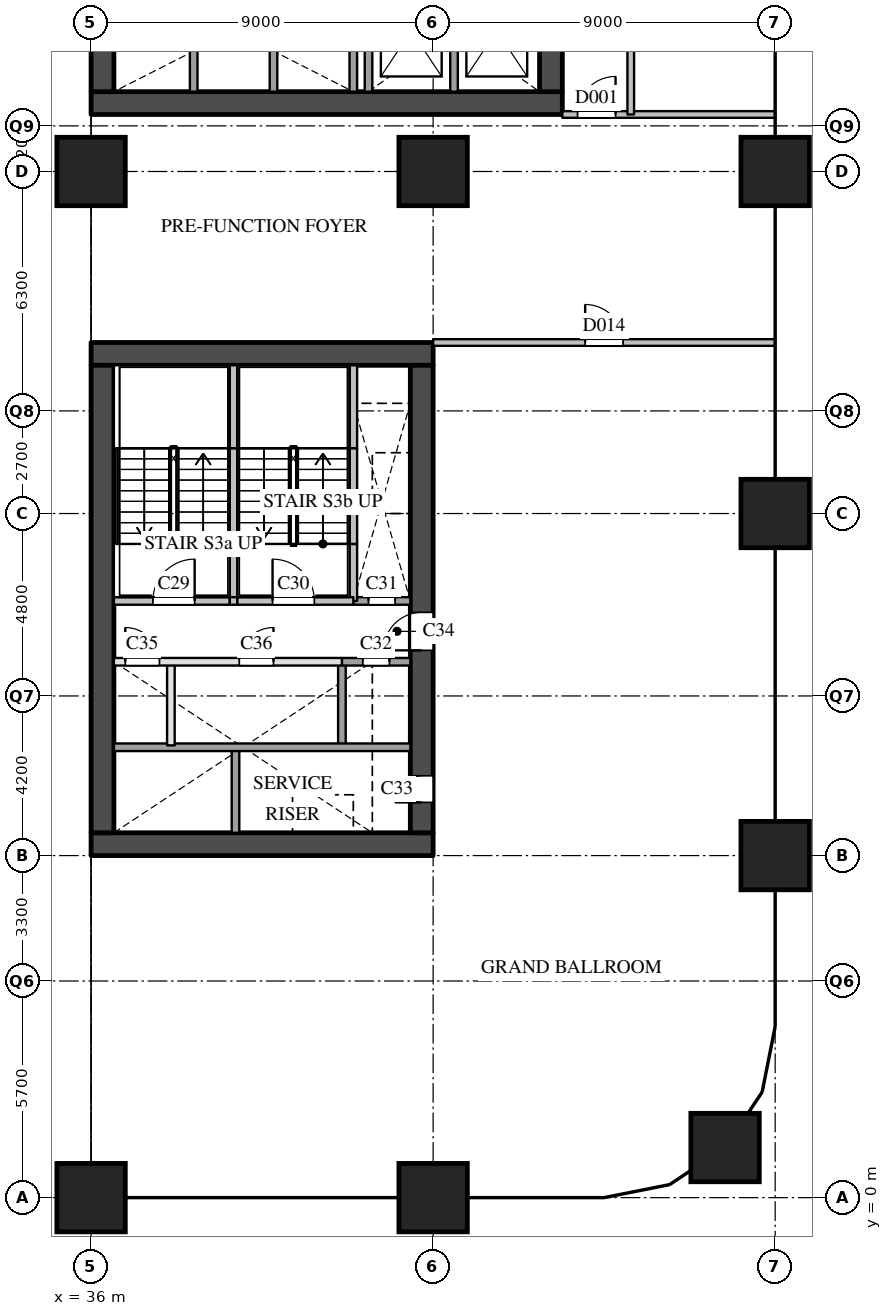
"""IFC4 building model, lengths in metres.
Left out: names, types, materials, properties, quantities, classifications, styles, units other than length and angle.
Written with IfcOpenShell. Run it as: python <this file> out.ifc"""

import sys

from ifc_helpers import new_model, si_unit, direction, frame, frame_2d, origin, origin_2d, place, context, subcontext, project, spatial, rectangle, extrude, element, fill, save


model = new_model("IFC4")
c1 = context("Model", 3, precision=1e-05, world=origin(), true_north=direction((0.0, 1.0)))
c2 = subcontext(c1, "Body", "Model", "MODEL_VIEW")
j1 = project(units=[si_unit("LENGTHUNIT", "METRE"), si_unit("PLANEANGLEUNIT", "RADIAN")], contexts=[c1])
p1 = place(None, origin())
s1 = spatial("IfcSite", under=j1, at=p1, CompositionType="ELEMENT")
p2 = place(p1, origin())
s2 = spatial("IfcBuilding", under=s1, at=p2, CompositionType="ELEMENT")
p3 = place(p2, frame((0.0, 0.0, 14.0)))
s3 = spatial("IfcBuildingStorey", under=s2, at=p3, CompositionType="ELEMENT", Elevation=14.0)
for number, where, z_axis, x_axis in (
    (1, (36.0, 0.0, 0.0), (0.0, 0.0, 1.0), (1.0, 0.0, 0.0)),
    (2, (36.0, 27.0, 0.0), (0.0, 0.0, 1.0), (1.0, 0.0, 0.0)),
    (3, (45.0, 0.0, 0.0), (0.0, 0.0, 1.0), (1.0, 0.0, 0.0)),
    (4, (45.0, 27.0, 0.0), (0.0, 0.0, 1.0), (1.0, 0.0, 0.0)),
    (5, (52.682, 1.318, 0.0), (0.0, 0.0, 1.0), (1.0, 0.0, 0.0)),
    (6, (54.0, 9.0, 0.0), (0.0, 0.0, 1.0), (1.0, 0.0, 0.0)),
    (7, (54.0, 18.0, 0.0), (0.0, 0.0, 1.0), (1.0, 0.0, 0.0)),
    (8, (54.0, 27.0, 0.0), (0.0, 0.0, 1.0), (1.0, 0.0, 0.0)),
):
    element("IfcColumn", number, at=place(p3, frame(where, z_axis=z_axis, x_axis=x_axis)), inside=s3, PredefinedType="COLUMN", context=c2, shape_type="SweptSolid", body=[
        extrude(rectangle(XDim=1.8, YDim=1.8, at=origin_2d()), origin(), (0.0, 0.0, 1.0), 7.0),
    ])
p4 = place(p3, frame((36.0, 28.8, 0.0), z_axis=(0.0, 0.0, 1.0), x_axis=(1.0, 0.0, 0.0)))
e9 = element("IfcWall", 9, at=p4, inside=s3, PredefinedType="SHEAR", context=c2, shape_type="SweptSolid", body=[
    extrude(rectangle(XDim=12.4, YDim=0.6, at=frame_2d((6.2, 0.0))), origin(), (0.0, 0.0, 1.0), 6.59),
])
p5 = place(p3, frame((36.3, 29.1, 0.0), z_axis=(0.0, 0.0, 1.0), x_axis=(0.0, 1.0, 0.0)))
e10 = element("IfcWall", 10, at=p5, inside=s3, PredefinedType="SHEAR", context=c2, shape_type="SweptSolid", body=[
    extrude(rectangle(XDim=20.3, YDim=0.6, at=frame_2d((10.15, 0.0))), origin(), (0.0, 0.0, 1.0), 6.59),
])
p6 = place(p3, frame((48.1, 29.1, 0.0), z_axis=(0.0, 0.0, 1.0), x_axis=(0.0, 1.0, 0.0)))
e11 = element("IfcWall", 11, at=p6, inside=s3, PredefinedType="SHEAR", context=c2, shape_type="SweptSolid", body=[
    extrude(rectangle(XDim=20.3, YDim=0.6, at=frame_2d((10.15, 0.0))), origin(), (0.0, 0.0, 1.0), 6.59),
])
p7 = place(p6, frame((12.5, 0.0, 0.0)))
e12 = element("IfcOpeningElement", 12, at=p7, cuts=e11, PredefinedType="OPENING", context=c2, shape_type="SweptSolid", body=[
    extrude(rectangle(XDim=0.7, YDim=2.1, at=frame_2d((0.35, 1.05))), frame((0.0, 0.31, 0.0), z_axis=(0.0, -1.0, 0.0), x_axis=(1.0, 0.0, 0.0)), (0.0, 0.0, 1.0), 0.62),
])
p8 = place(p6, frame((3.9, 0.0, 0.0)))
e13 = element("IfcOpeningElement", 13, at=p8, cuts=e11, PredefinedType="OPENING", context=c2, shape_type="SweptSolid", body=[
    extrude(rectangle(XDim=1.8, YDim=2.1, at=frame_2d((0.9, 1.05))), frame((0.0, 0.31, 0.0), z_axis=(0.0, -1.0, 0.0), x_axis=(1.0, 0.0, 0.0)), (0.0, 0.0, 1.0), 0.62),
])
p9 = place(p6, frame((16.4, 0.0, 0.0)))
e14 = element("IfcOpeningElement", 14, at=p9, cuts=e11, PredefinedType="OPENING", context=c2, shape_type="SweptSolid", body=[
    extrude(rectangle(XDim=1.0, YDim=2.1, at=frame_2d((0.5, 1.05))), frame((0.0, 0.31, 0.0), z_axis=(0.0, -1.0, 0.0), x_axis=(1.0, 0.0, 0.0)), (0.0, 0.0, 1.0), 0.62),
])
for number, where, z_axis, x_axis in (
    (15, (38.7, 29.1, 0.0), (0.0, 0.0, 1.0), (0.0, 1.0, 0.0)),
    (16, (40.8, 29.1, 0.0), (0.0, 0.0, 1.0), (0.0, 1.0, 0.0)),
    (17, (42.9, 29.1, 0.0), (0.0, 0.0, 1.0), (0.0, 1.0, 0.0)),
):
    element("IfcWall", number, at=place(p3, frame(where, z_axis=z_axis, x_axis=x_axis)), inside=s3, PredefinedType="SOLIDWALL", context=c2, shape_type="SweptSolid", body=[
        extrude(rectangle(XDim=3.2, YDim=0.2, at=frame_2d((1.6, 0.0))), origin(), (0.0, 0.0, 1.0), 6.59),
    ])
p10 = place(p3, frame((43.3, 29.1, 0.0), z_axis=(0.0, 0.0, 1.0), x_axis=(0.0, 1.0, 0.0)))
e18 = element("IfcWall", 18, at=p10, inside=s3, PredefinedType="SOLIDWALL", context=c2, shape_type="SweptSolid", body=[
    extrude(rectangle(XDim=9.9, YDim=0.2, at=frame_2d((4.95, 0.0))), origin(), (0.0, 0.0, 1.0), 6.59),
])
p11 = place(p10, frame((3.6, 0.0, 0.0)))
e19 = element("IfcOpeningElement", 19, at=p11, cuts=e18, PredefinedType="OPENING", context=c2, shape_type="SweptSolid", body=[
    extrude(rectangle(XDim=1.8, YDim=2.1, at=frame_2d((0.9, 1.05))), frame((0.0, 0.11, 0.0), z_axis=(0.0, -1.0, 0.0), x_axis=(1.0, 0.0, 0.0)), (0.0, 0.0, 1.0), 0.22),
])
p12 = place(p3, frame((45.55, 29.1, 0.0), z_axis=(0.0, 0.0, 1.0), x_axis=(0.0, 1.0, 0.0)))
e20 = element("IfcWall", 20, at=p12, inside=s3, PredefinedType="SOLIDWALL", context=c2, shape_type="SweptSolid", body=[
    extrude(rectangle(XDim=3.2, YDim=0.2, at=frame_2d((1.6, 0.0))), origin(), (0.0, 0.0, 1.0), 6.59),
])
for number, where, z_axis, x_axis in (
    (21, (36.0, 9.3, 0.0), (0.0, 0.0, 1.0), (1.0, 0.0, 0.0)),
    (22, (36.0, 22.2, 0.0), (0.0, 0.0, 1.0), (1.0, 0.0, 0.0)),
):
    element("IfcWall", number, at=place(p3, frame(where, z_axis=z_axis, x_axis=x_axis)), inside=s3, PredefinedType="SHEAR", context=c2, shape_type="SweptSolid", body=[
        extrude(rectangle(XDim=9.0, YDim=0.6, at=frame_2d((4.5, 0.0))), origin(), (0.0, 0.0, 1.0), 6.59),
    ])
p13 = place(p3, frame((36.3, 9.6, 0.0), z_axis=(0.0, 0.0, 1.0), x_axis=(0.0, 1.0, 0.0)))
e23 = element("IfcWall", 23, at=p13, inside=s3, PredefinedType="SHEAR", context=c2, shape_type="SweptSolid", body=[
    extrude(rectangle(XDim=12.3, YDim=0.6, at=frame_2d((6.15, 0.0))), origin(), (0.0, 0.0, 1.0), 6.59),
])
p14 = place(p3, frame((44.7, 9.6, 0.0), z_axis=(0.0, 0.0, 1.0), x_axis=(0.0, 1.0, 0.0)))
e24 = element("IfcWall", 24, at=p14, inside=s3, PredefinedType="SHEAR", context=c2, shape_type="SweptSolid", body=[
    extrude(rectangle(XDim=12.3, YDim=0.6, at=frame_2d((6.15, 0.0))), origin(), (0.0, 0.0, 1.0), 6.59),
])
p15 = place(p14, frame((0.8, 0.0, 0.0)))
e25 = element("IfcOpeningElement", 25, at=p15, cuts=e24, PredefinedType="OPENING", context=c2, shape_type="SweptSolid", body=[
    extrude(rectangle(XDim=0.7, YDim=2.1, at=frame_2d((0.35, 1.05))), frame((0.0, 0.31, 0.0), z_axis=(0.0, -1.0, 0.0), x_axis=(1.0, 0.0, 0.0)), (0.0, 0.0, 1.0), 0.62),
])
p16 = place(p14, frame((4.8, 0.0, 0.0)))
e26 = element("IfcOpeningElement", 26, at=p16, cuts=e24, PredefinedType="OPENING", context=c2, shape_type="SweptSolid", body=[
    extrude(rectangle(XDim=1.0, YDim=2.1, at=frame_2d((0.5, 1.05))), frame((0.0, 0.31, 0.0), z_axis=(0.0, -1.0, 0.0), x_axis=(1.0, 0.0, 0.0)), (0.0, 0.0, 1.0), 0.62),
])
p17 = place(p3, frame((38.1, 11.9, 0.0), z_axis=(0.0, 0.0, 1.0), x_axis=(0.0, 1.0, 0.0)))
e27 = element("IfcWall", 27, at=p17, inside=s3, PredefinedType="PARTITIONING", context=c2, shape_type="SweptSolid", body=[
    extrude(rectangle(XDim=2.2, YDim=0.2, at=frame_2d((1.1, 0.0))), origin(), (0.0, 0.0, 1.0), 6.59),
])
p18 = place(p3, frame((39.75, 15.7, 0.0), z_axis=(0.0, 0.0, 1.0), x_axis=(0.0, 1.0, 0.0)))
e28 = element("IfcWall", 28, at=p18, inside=s3, PredefinedType="SOLIDWALL", context=c2, shape_type="SweptSolid", body=[
    extrude(rectangle(XDim=1.5, YDim=0.2, at=frame_2d((0.75, 0.0))), origin(), (0.0, 0.0, 1.0), 6.59),
])
p19 = place(p3, frame((39.75, 17.2, 0.0), z_axis=(0.0, 0.0, 1.0), x_axis=(0.0, 1.0, 0.0)))
e29 = element("IfcWall", 29, at=p19, inside=s3, PredefinedType="SOLIDWALL", context=c2, shape_type="SweptSolid", body=[
    extrude(rectangle(XDim=2.52, YDim=0.2, at=frame_2d((1.26, 0.0))), origin(), (0.0, 0.0, 1.0), 6.59),
])
p20 = place(p3, frame((39.75, 19.72, 0.0), z_axis=(0.0, 0.0, 1.0), x_axis=(0.0, 1.0, 0.0)))
e30 = element("IfcWall", 30, at=p20, inside=s3, PredefinedType="SOLIDWALL", context=c2, shape_type="SweptSolid", body=[
    extrude(rectangle(XDim=2.18, YDim=0.2, at=frame_2d((1.09, 0.0))), origin(), (0.0, 0.0, 1.0), 6.59),
])
p21 = place(p3, frame((39.8, 9.6, 0.0), z_axis=(0.0, 0.0, 1.0), x_axis=(0.0, 1.0, 0.0)))
e31 = element("IfcWall", 31, at=p21, inside=s3, PredefinedType="SOLIDWALL", context=c2, shape_type="SweptSolid", body=[
    extrude(rectangle(XDim=2.3, YDim=0.2, at=frame_2d((1.15, 0.0))), origin(), (0.0, 0.0, 1.0), 6.59),
])
p22 = place(p3, frame((42.6, 11.9, 0.0), z_axis=(0.0, 0.0, 1.0), x_axis=(0.0, 1.0, 0.0)))
e32 = element("IfcWall", 32, at=p22, inside=s3, PredefinedType="SOLIDWALL", context=c2, shape_type="SweptSolid", body=[
    extrude(rectangle(XDim=2.2, YDim=0.2, at=frame_2d((1.1, 0.0))), origin(), (0.0, 0.0, 1.0), 6.59),
])
p23 = place(p3, frame((42.9, 15.7, 0.0), z_axis=(0.0, 0.0, 1.0), x_axis=(0.0, 1.0, 0.0)))
e33 = element("IfcWall", 33, at=p23, inside=s3, PredefinedType="SOLIDWALL", context=c2, shape_type="SweptSolid", body=[
    extrude(rectangle(XDim=1.5, YDim=0.2, at=frame_2d((0.75, 0.0))), origin(), (0.0, 0.0, 1.0), 6.59),
])
p24 = place(p3, frame((42.9, 17.2, 0.0), z_axis=(0.0, 0.0, 1.0), x_axis=(0.0, 1.0, 0.0)))
e34 = element("IfcWall", 34, at=p24, inside=s3, PredefinedType="SOLIDWALL", context=c2, shape_type="SweptSolid", body=[
    extrude(rectangle(XDim=2.52, YDim=0.2, at=frame_2d((1.26, 0.0))), origin(), (0.0, 0.0, 1.0), 6.59),
])
p25 = place(p3, frame((42.9, 19.72, 0.0), z_axis=(0.0, 0.0, 1.0), x_axis=(0.0, 1.0, 0.0)))
e35 = element("IfcWall", 35, at=p25, inside=s3, PredefinedType="SOLIDWALL", context=c2, shape_type="SweptSolid", body=[
    extrude(rectangle(XDim=2.18, YDim=0.2, at=frame_2d((1.09, 0.0))), origin(), (0.0, 0.0, 1.0), 6.59),
])
p26 = place(p3, frame((36.6, 11.85, 0.0), z_axis=(0.0, 0.0, 1.0), x_axis=(1.0, 0.0, 0.0)))
e36 = element("IfcWall", 36, at=p26, inside=s3, PredefinedType="SOLIDWALL", context=c2, shape_type="SweptSolid", body=[
    extrude(rectangle(XDim=7.8, YDim=0.2, at=frame_2d((3.9, 0.0))), origin(), (0.0, 0.0, 1.0), 6.59),
])
p27 = place(p3, frame((36.6, 14.1, 0.0), z_axis=(0.0, 0.0, 1.0), x_axis=(1.0, 0.0, 0.0)))
e37 = element("IfcWall", 37, at=p27, inside=s3, PredefinedType="PARTITIONING", context=c2, shape_type="SweptSolid", body=[
    extrude(rectangle(XDim=6.0, YDim=0.2, at=frame_2d((3.0, 0.0))), origin(), (0.0, 0.0, 1.0), 6.59),
])
p28 = place(p27, frame((0.3, 0.0, 0.0)))
e38 = element("IfcOpeningElement", 38, at=p28, cuts=e37, PredefinedType="OPENING", context=c2, shape_type="SweptSolid", body=[
    extrude(rectangle(XDim=0.9, YDim=2.1, at=frame_2d((0.45, 1.05))), frame((0.0, 0.11, 0.0), z_axis=(0.0, -1.0, 0.0), x_axis=(1.0, 0.0, 0.0)), (0.0, 0.0, 1.0), 0.22),
])
p29 = place(p27, frame((3.3, 0.0, 0.0)))
e39 = element("IfcOpeningElement", 39, at=p29, cuts=e37, PredefinedType="OPENING", context=c2, shape_type="SweptSolid", body=[
    extrude(rectangle(XDim=0.9, YDim=2.1, at=frame_2d((0.45, 1.05))), frame((0.0, 0.11, 0.0), z_axis=(0.0, -1.0, 0.0), x_axis=(1.0, 0.0, 0.0)), (0.0, 0.0, 1.0), 0.22),
])
p30 = place(p3, frame((42.6, 14.1, 0.0), z_axis=(0.0, 0.0, 1.0), x_axis=(1.0, 0.0, 0.0)))
e40 = element("IfcWall", 40, at=p30, inside=s3, PredefinedType="SOLIDWALL", context=c2, shape_type="SweptSolid", body=[
    extrude(rectangle(XDim=1.8, YDim=0.2, at=frame_2d((0.9, 0.0))), origin(), (0.0, 0.0, 1.0), 6.59),
])
p31 = place(p30, frame((0.55, 0.0, 0.0)))
e41 = element("IfcOpeningElement", 41, at=p31, cuts=e40, PredefinedType="OPENING", context=c2, shape_type="SweptSolid", body=[
    extrude(rectangle(XDim=0.7, YDim=2.1, at=frame_2d((0.35, 1.05))), frame((0.0, 0.11, 0.0), z_axis=(0.0, -1.0, 0.0), x_axis=(1.0, 0.0, 0.0)), (0.0, 0.0, 1.0), 0.22),
])
p32 = place(p3, frame((42.9, 15.7, 0.0), z_axis=(0.0, 0.0, 1.0), x_axis=(1.0, 0.0, 0.0)))
e42 = element("IfcWall", 42, at=p32, inside=s3, PredefinedType="SOLIDWALL", context=c2, shape_type="SweptSolid", body=[
    extrude(rectangle(XDim=1.5, YDim=0.2, at=frame_2d((0.75, 0.0))), origin(), (0.0, 0.0, 1.0), 6.59),
])
p33 = place(p32, frame((0.4, 0.0, 0.0)))
e43 = element("IfcOpeningElement", 43, at=p33, cuts=e42, PredefinedType="OPENING", context=c2, shape_type="SweptSolid", body=[
    extrude(rectangle(XDim=0.7, YDim=2.1, at=frame_2d((0.35, 1.05))), frame((0.0, 0.11, 0.0), z_axis=(0.0, -1.0, 0.0), x_axis=(1.0, 0.0, 0.0)), (0.0, 0.0, 1.0), 0.22),
])
p34 = place(p3, frame((36.6, 15.7, 0.0), z_axis=(0.0, 0.0, 1.0), x_axis=(1.0, 0.0, 0.0)))
e44 = element("IfcWall", 44, at=p34, inside=s3, PredefinedType="SOLIDWALL", context=c2, shape_type="SweptSolid", body=[
    extrude(rectangle(XDim=3.05, YDim=0.2, at=frame_2d((1.525, 0.0))), origin(), (0.0, 0.0, 1.0), 6.59),
])
p35 = place(p34, frame((1.025, 0.0, 0.0)))
e45 = element("IfcOpeningElement", 45, at=p35, cuts=e44, PredefinedType="OPENING", context=c2, shape_type="SweptSolid", body=[
    extrude(rectangle(XDim=1.1, YDim=2.1, at=frame_2d((0.55, 1.05))), frame((0.0, 0.11, 0.0), z_axis=(0.0, -1.0, 0.0), x_axis=(1.0, 0.0, 0.0)), (0.0, 0.0, 1.0), 0.22),
])
p36 = place(p3, frame((39.65, 15.7, 0.0), z_axis=(0.0, 0.0, 1.0), x_axis=(1.0, 0.0, 0.0)))
e46 = element("IfcWall", 46, at=p36, inside=s3, PredefinedType="SOLIDWALL", context=c2, shape_type="SweptSolid", body=[
    extrude(rectangle(XDim=0.2, YDim=0.2, at=frame_2d((0.1, 0.0))), origin(), (0.0, 0.0, 1.0), 6.59),
])
p37 = place(p3, frame((39.85, 15.7, 0.0), z_axis=(0.0, 0.0, 1.0), x_axis=(1.0, 0.0, 0.0)))
e47 = element("IfcWall", 47, at=p37, inside=s3, PredefinedType="SOLIDWALL", context=c2, shape_type="SweptSolid", body=[
    extrude(rectangle(XDim=3.05, YDim=0.2, at=frame_2d((1.525, 0.0))), origin(), (0.0, 0.0, 1.0), 6.59),
])
p38 = place(p37, frame((0.925, 0.0, 0.0)))
e48 = element("IfcOpeningElement", 48, at=p38, cuts=e47, PredefinedType="OPENING", context=c2, shape_type="SweptSolid", body=[
    extrude(rectangle(XDim=1.1, YDim=2.1, at=frame_2d((0.55, 1.05))), frame((0.0, 0.11, 0.0), z_axis=(0.0, -1.0, 0.0), x_axis=(1.0, 0.0, 0.0)), (0.0, 0.0, 1.0), 0.22),
])
p39 = place(p3, frame((45.0, 22.5, 0.0), z_axis=(0.0, 0.0, 1.0), x_axis=(1.0, 0.0, 0.0)))
e49 = element("IfcWall", 49, at=p39, inside=s3, PredefinedType="PARTITIONING", context=c2, shape_type="SweptSolid", body=[
    extrude(rectangle(XDim=9.0, YDim=0.175, at=frame_2d((4.5, 0.0))), origin(), (0.0, 0.0, 1.0), 5.59),
])
p40 = place(p39, frame((4.0, 0.0, 0.0)))
e50 = element("IfcOpeningElement", 50, at=p40, cuts=e49, PredefinedType="OPENING", context=c2, shape_type="SweptSolid", body=[
    extrude(rectangle(XDim=1.0, YDim=2.1, at=frame_2d((0.5, 1.05))), frame((0.0, 0.097, 0.0), z_axis=(0.0, -1.0, 0.0), x_axis=(1.0, 0.0, 0.0)), (0.0, 0.0, 1.0), 0.195),
])
p41 = place(p3, frame((48.4, 28.5, 0.0), z_axis=(0.0, 0.0, 1.0), x_axis=(1.0, 0.0, 0.0)))
e51 = element("IfcWall", 51, at=p41, inside=s3, PredefinedType="PARTITIONING", context=c2, shape_type="SweptSolid", body=[
    extrude(rectangle(XDim=5.6, YDim=0.175, at=frame_2d((2.8, 0.0))), origin(), (0.0, 0.0, 1.0), 5.59),
])
p42 = place(p41, frame((0.4, 0.0, 0.0)))
e52 = element("IfcOpeningElement", 52, at=p42, cuts=e51, PredefinedType="OPENING", context=c2, shape_type="SweptSolid", body=[
    extrude(rectangle(XDim=1.0, YDim=2.1, at=frame_2d((0.5, 1.05))), frame((0.0, 0.097, 0.0), z_axis=(0.0, -1.0, 0.0), x_axis=(1.0, 0.0, 0.0)), (0.0, 0.0, 1.0), 0.195),
])
p43 = place(p3, frame((50.2, 28.5, 0.0), z_axis=(0.0, 0.0, 1.0), x_axis=(0.0, 1.0, 0.0)))
e53 = element("IfcWall", 53, at=p43, inside=s3, PredefinedType="PARTITIONING", context=c2, shape_type="SweptSolid", body=[
    extrude(rectangle(XDim=21.5, YDim=0.175, at=frame_2d((10.75, 0.0))), origin(), (0.0, 0.0, 1.0), 6.59),
])
p44 = place(p43, frame((18.5, 0.0, 0.0)))
e54 = element("IfcOpeningElement", 54, at=p44, cuts=e53, PredefinedType="OPENING", context=c2, shape_type="SweptSolid", body=[
    extrude(rectangle(XDim=1.0, YDim=2.1, at=frame_2d((0.5, 1.05))), frame((0.0, 0.097, 0.0), z_axis=(0.0, -1.0, 0.0), x_axis=(1.0, 0.0, 0.0)), (0.0, 0.0, 1.0), 0.195),
])
p45 = place(p43, frame((7.75, 0.0, 0.0)))
e55 = element("IfcOpeningElement", 55, at=p45, cuts=e53, PredefinedType="OPENING", context=c2, shape_type="SweptSolid", body=[
    extrude(rectangle(XDim=1.0, YDim=2.1, at=frame_2d((0.5, 1.05))), frame((0.0, 0.097, 0.0), z_axis=(0.0, -1.0, 0.0), x_axis=(1.0, 0.0, 0.0)), (0.0, 0.0, 1.0), 0.195),
])
p46 = place(p35, origin())
e56 = element("IfcDoor", 56, at=p46, inside=s3, OperationType="SINGLE_SWING_RIGHT", PredefinedType="DOOR", context=c2, shape_type="SweptSolid", body=[
    extrude(rectangle(XDim=1.1, YDim=2.1, at=frame_2d((0.55, 1.05))), frame((0.0, 0.025, 0.0), z_axis=(0.0, -1.0, 0.0), x_axis=(1.0, 0.0, 0.0)), (0.0, 0.0, 1.0), 0.05),
])
fill(e45, e56)
p47 = place(p38, origin())
e57 = element("IfcDoor", 57, at=p47, inside=s3, OperationType="SINGLE_SWING_LEFT", PredefinedType="DOOR", context=c2, shape_type="SweptSolid", body=[
    extrude(rectangle(XDim=1.1, YDim=2.1, at=frame_2d((0.55, 1.05))), frame((0.0, 0.025, 0.0), z_axis=(0.0, -1.0, 0.0), x_axis=(1.0, 0.0, 0.0)), (0.0, 0.0, 1.0), 0.05),
])
fill(e48, e57)
p48 = place(p33, origin())
e58 = element("IfcDoor", 58, at=p48, inside=s3, OperationType="SINGLE_SWING_LEFT", PredefinedType="DOOR", context=c2, shape_type="SweptSolid", body=[
    extrude(rectangle(XDim=0.7, YDim=2.1, at=frame_2d((0.35, 1.05))), frame((0.0, 0.025, 0.0), z_axis=(0.0, -1.0, 0.0), x_axis=(1.0, 0.0, 0.0)), (0.0, 0.0, 1.0), 0.05),
])
fill(e43, e58)
p49 = place(p31, origin())
e59 = element("IfcDoor", 59, at=p49, inside=s3, OperationType="SINGLE_SWING_RIGHT", PredefinedType="DOOR", context=c2, shape_type="SweptSolid", body=[
    extrude(rectangle(XDim=0.7, YDim=2.1, at=frame_2d((0.35, 1.05))), frame((0.0, 0.025, 0.0), z_axis=(0.0, -1.0, 0.0), x_axis=(1.0, 0.0, 0.0)), (0.0, 0.0, 1.0), 0.05),
])
fill(e41, e59)
p50 = place(p15, origin())
e60 = element("IfcDoor", 60, at=p50, inside=s3, OperationType="SINGLE_SWING_LEFT", PredefinedType="DOOR", context=c2, shape_type="SweptSolid", body=[
    extrude(rectangle(XDim=0.7, YDim=2.1, at=frame_2d((0.35, 1.05))), frame((0.0, 0.025, 0.0), z_axis=(0.0, -1.0, 0.0), x_axis=(1.0, 0.0, 0.0)), (0.0, 0.0, 1.0), 0.05),
])
fill(e25, e60)
p51 = place(p16, origin())
e61 = element("IfcDoor", 61, at=p51, inside=s3, OperationType="SINGLE_SWING_LEFT", PredefinedType="DOOR", context=c2, shape_type="SweptSolid", body=[
    extrude(rectangle(XDim=1.0, YDim=2.1, at=frame_2d((0.5, 1.05))), frame((0.0, 0.025, 0.0), z_axis=(0.0, -1.0, 0.0), x_axis=(1.0, 0.0, 0.0)), (0.0, 0.0, 1.0), 0.05),
])
fill(e26, e61)
p52 = place(p28, origin())
e62 = element("IfcDoor", 62, at=p52, inside=s3, OperationType="SINGLE_SWING_LEFT", PredefinedType="DOOR", context=c2, shape_type="SweptSolid", body=[
    extrude(rectangle(XDim=0.9, YDim=2.1, at=frame_2d((0.45, 1.05))), frame((0.0, 0.025, 0.0), z_axis=(0.0, -1.0, 0.0), x_axis=(1.0, 0.0, 0.0)), (0.0, 0.0, 1.0), 0.05),
])
fill(e38, e62)
p53 = place(p29, origin())
e63 = element("IfcDoor", 63, at=p53, inside=s3, OperationType="SINGLE_SWING_RIGHT", PredefinedType="DOOR", context=c2, shape_type="SweptSolid", body=[
    extrude(rectangle(XDim=0.9, YDim=2.1, at=frame_2d((0.45, 1.05))), frame((0.0, 0.025, 0.0), z_axis=(0.0, -1.0, 0.0), x_axis=(1.0, 0.0, 0.0)), (0.0, 0.0, 1.0), 0.05),
])
fill(e39, e63)
p54 = place(p42, origin())
e64 = element("IfcDoor", 64, at=p54, inside=s3, OperationType="SINGLE_SWING_RIGHT", PredefinedType="DOOR", context=c2, shape_type="SweptSolid", body=[
    extrude(rectangle(XDim=1.0, YDim=2.1, at=frame_2d((0.5, 1.05))), frame((0.0, 0.025, 0.0), z_axis=(0.0, -1.0, 0.0), x_axis=(1.0, 0.0, 0.0)), (0.0, 0.0, 1.0), 0.05),
])
fill(e52, e64)
p55 = place(p40, origin())
e65 = element("IfcDoor", 65, at=p55, inside=s3, OperationType="SINGLE_SWING_LEFT", PredefinedType="DOOR", context=c2, shape_type="SweptSolid", body=[
    extrude(rectangle(XDim=1.0, YDim=2.1, at=frame_2d((0.5, 1.05))), frame((0.0, 0.025, 0.0), z_axis=(0.0, -1.0, 0.0), x_axis=(1.0, 0.0, 0.0)), (0.0, 0.0, 1.0), 0.05),
])
fill(e50, e65)
save(model, sys.argv[1])
